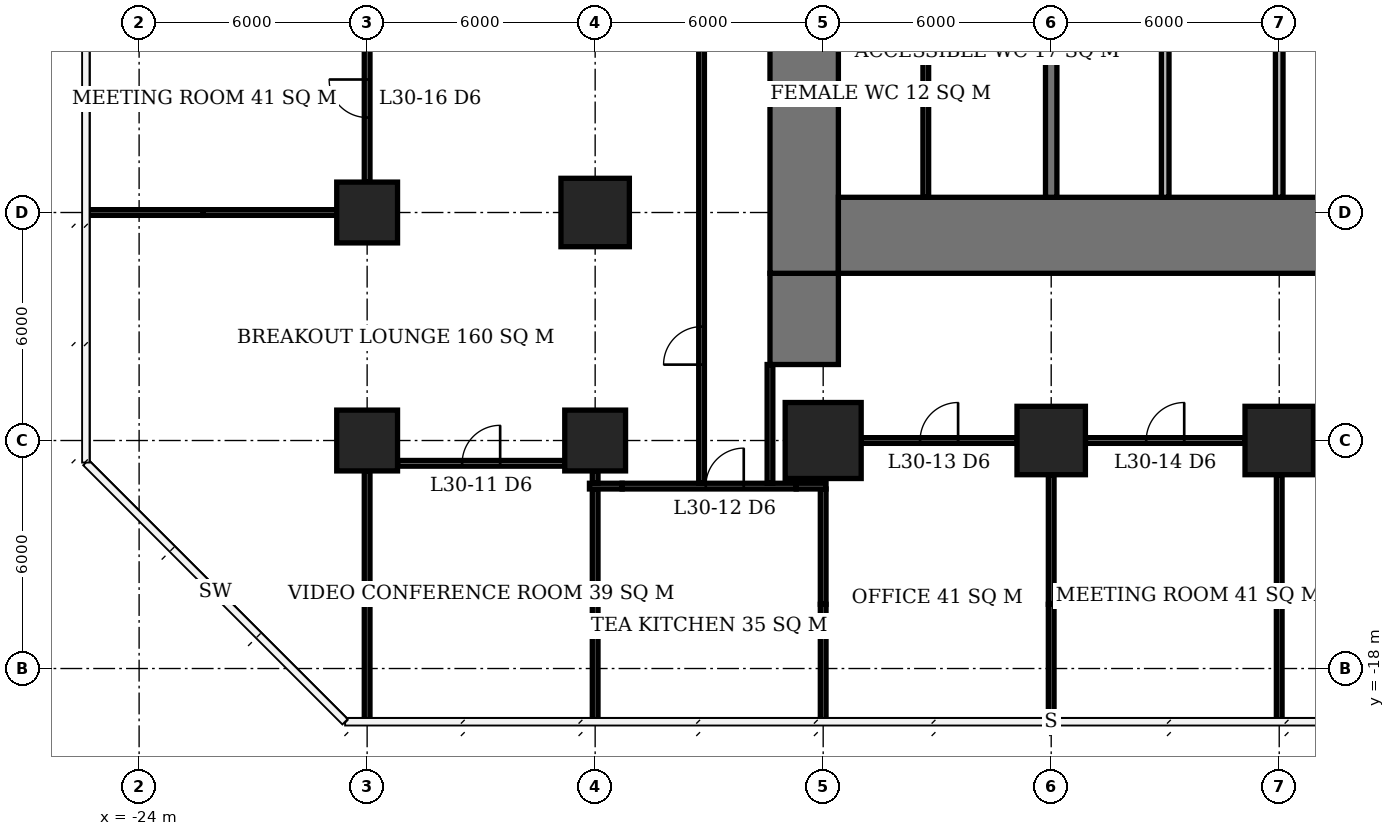
"""IFC4 building model, lengths in metres.
Left out: names, types, materials, properties, quantities, classifications, styles, units other than length and angle.
Written with IfcOpenShell. Run it as: python <this file> out.ifc"""

import sys

from ifc_helpers import new_model, si_unit, direction, frame, frame_2d, origin, origin_2d, place, context, subcontext, project, spatial, rectangle, extrude, element, fill, save


model = new_model("IFC4")
c1 = context("Model", 3, precision=1e-05, world=origin(), true_north=direction((0.0, 1.0)))
c2 = subcontext(c1, "Body", "Model", "MODEL_VIEW")
j1 = project(units=[si_unit("LENGTHUNIT", "METRE"), si_unit("PLANEANGLEUNIT", "RADIAN")], contexts=[c1])
p1 = place(None, origin())
s1 = spatial("IfcSite", under=j1, at=p1, CompositionType="ELEMENT")
p2 = place(p1, origin())
s2 = spatial("IfcBuilding", under=s1, at=p2, CompositionType="ELEMENT")
p3 = place(p2, frame((0.0, 0.0, 125.0)))
s3 = spatial("IfcBuildingStorey", under=s2, at=p3, CompositionType="ELEMENT", Elevation=125.0)
for number, where, z_axis, x_axis in (
    (1, (-18.0, -12.0, 0.0), (0.0, 0.0, 1.0), (1.0, 0.0, 0.0)),
    (2, (-18.0, -6.0, 0.0), (0.0, 0.0, 1.0), (1.0, 0.0, 0.0)),
    (3, (-12.0, -12.0, 0.0), (0.0, 0.0, 1.0), (1.0, 0.0, 0.0)),
):
    element("IfcColumn", number, at=place(p3, frame(where, z_axis=z_axis, x_axis=x_axis)), inside=s3, PredefinedType="COLUMN", context=c2, shape_type="SweptSolid", body=[
        extrude(rectangle(XDim=1.6, YDim=1.6, at=origin_2d()), origin(), (0.0, 0.0, 1.0), 3.9),
    ])
p4 = place(p3, frame((-12.0, -6.0, 0.0), z_axis=(0.0, 0.0, 1.0), x_axis=(1.0, 0.0, 0.0)))
e4 = element("IfcColumn", 4, at=p4, inside=s3, PredefinedType="COLUMN", context=c2, shape_type="SweptSolid", body=[
    extrude(rectangle(XDim=1.8, YDim=1.8, at=origin_2d()), origin(), (0.0, 0.0, 1.0), 3.9),
])
p5 = place(p3, frame((-6.0, -12.0, 0.0), z_axis=(0.0, 0.0, 1.0), x_axis=(1.0, 0.0, 0.0)))
e5 = element("IfcColumn", 5, at=p5, inside=s3, PredefinedType="COLUMN", context=c2, shape_type="SweptSolid", body=[
    extrude(rectangle(XDim=2.0, YDim=2.0, at=origin_2d()), origin(), (0.0, 0.0, 1.0), 3.9),
])
for number, where, z_axis, x_axis in (
    (6, (0.0, -12.0, 0.0), (0.0, 0.0, 1.0), (1.0, 0.0, 0.0)),
    (7, (6.0, -12.0, 0.0), (0.0, 0.0, 1.0), (1.0, 0.0, 0.0)),
):
    element("IfcColumn", number, at=place(p3, frame(where, z_axis=z_axis, x_axis=x_axis)), inside=s3, PredefinedType="COLUMN", context=c2, shape_type="SweptSolid", body=[
        extrude(rectangle(XDim=1.8, YDim=1.8, at=origin_2d()), origin(), (0.0, 0.0, 1.0), 3.9),
    ])
p6 = place(p3, frame((-5.6, -6.6, 0.0), z_axis=(0.0, 0.0, 1.0), x_axis=(1.0, 0.0, 0.0)))
e8 = element("IfcWall", 8, at=p6, inside=s3, PredefinedType="SHEAR", context=c2, shape_type="SweptSolid", body=[
    extrude(rectangle(XDim=23.2, YDim=2.0, at=frame_2d((11.6, 0.0))), origin(), (0.0, 0.0, 1.0), 3.9),
])
p7 = place(p3, frame((-6.5, -7.6, 0.0), z_axis=(0.0, 0.0, 1.0), x_axis=(0.0, 1.0, 0.0)))
e9 = element("IfcWall", 9, at=p7, inside=s3, PredefinedType="SHEAR", context=c2, shape_type="SweptSolid", body=[
    extrude(rectangle(XDim=21.2, YDim=1.8, at=frame_2d((10.6, 0.0))), origin(), (0.0, 0.0, 1.0), 3.9),
])
p8 = place(p7, frame((7.8, 0.0, 0.0)))
e10 = element("IfcOpeningElement", 10, at=p8, cuts=e9, PredefinedType="OPENING", context=c2, shape_type="SweptSolid", body=[
    extrude(rectangle(XDim=1.8, YDim=2.4, at=frame_2d((0.9, 1.2))), frame((0.0, 0.91, 0.0), z_axis=(0.0, -1.0, 0.0), x_axis=(1.0, 0.0, 0.0)), (0.0, 0.0, 1.0), 1.82),
])
p9 = place(p3, frame((-6.5, -10.0, 0.0), z_axis=(0.0, 0.0, 1.0), x_axis=(0.0, 1.0, 0.0)))
e11 = element("IfcWall", 11, at=p9, inside=s3, PredefinedType="SHEAR", context=c2, shape_type="SweptSolid", body=[
    extrude(rectangle(XDim=2.4, YDim=1.8, at=frame_2d((1.2, 0.0))), origin(), (0.0, 0.0, 1.0), 3.9),
])
p10 = place(p3, frame((0.0, -5.6, 0.0), z_axis=(0.0, 0.0, 1.0), x_axis=(0.0, 1.0, 0.0)))
e12 = element("IfcWall", 12, at=p10, inside=s3, PredefinedType="SHEAR", context=c2, shape_type="SweptSolid", body=[
    extrude(rectangle(XDim=5.45, YDim=0.3, at=frame_2d((2.725, 0.0))), origin(), (0.0, 0.0, 1.0), 3.9),
])
for number, where, z_axis, x_axis in (
    (13, (3.0, -5.6, 0.0), (0.0, 0.0, 1.0), (0.0, 1.0, 0.0)),
    (14, (6.0, -5.6, 0.0), (0.0, 0.0, 1.0), (0.0, 1.0, 0.0)),
):
    element("IfcWall", number, at=place(p3, frame(where, z_axis=z_axis, x_axis=x_axis)), inside=s3, PredefinedType="SOLIDWALL", context=c2, shape_type="SweptSolid", body=[
        extrude(rectangle(XDim=5.45, YDim=0.2, at=frame_2d((2.725, 0.0))), origin(), (0.0, 0.0, 1.0), 3.9),
    ])
p11 = place(p3, frame((-3.3, -5.6, 0.0), z_axis=(0.0, 0.0, 1.0), x_axis=(0.0, 1.0, 0.0)))
e15 = element("IfcWall", 15, at=p11, inside=s3, PredefinedType="PLUMBINGWALL", context=c2, shape_type="SweptSolid", body=[
    extrude(rectangle(XDim=5.45, YDim=0.15, at=frame_2d((2.725, 0.0))), origin(), (0.0, 0.0, 1.0), 3.65),
])
p12 = place(p3, frame((-12.15, -13.2, 0.0), z_axis=(0.0, 0.0, 1.0), x_axis=(1.0, 0.0, 0.0)))
e16 = element("IfcWall", 16, at=p12, inside=s3, PredefinedType="PARTITIONING", context=c2, shape_type="SweptSolid", body=[
    extrude(rectangle(XDim=0.86, YDim=0.15, at=frame_2d((0.43, 0.0))), origin(), (0.0, 0.0, 1.0), 2.65),
])
p13 = place(p3, frame((-11.29, -13.2, 0.0), z_axis=(0.0, 0.0, 1.0), x_axis=(1.0, 0.0, 0.0)))
e17 = element("IfcWall", 17, at=p13, inside=s3, PredefinedType="PARTITIONING", context=c2, shape_type="SweptSolid", body=[
    extrude(rectangle(XDim=4.58, YDim=0.15, at=frame_2d((2.29, 0.0))), origin(), (0.0, 0.0, 1.0), 3.65),
])
p14 = place(p13, frame((2.2, 0.0, 0.0)))
e18 = element("IfcOpeningElement", 18, at=p14, cuts=e17, PredefinedType="OPENING", context=c2, shape_type="SweptSolid", body=[
    extrude(rectangle(XDim=1.0, YDim=2.1, at=frame_2d((0.5, 1.05))), frame((0.0, 0.085, 0.0), z_axis=(0.0, -1.0, 0.0), x_axis=(1.0, 0.0, 0.0)), (0.0, 0.0, 1.0), 0.17),
])
p15 = place(p3, frame((-6.71, -13.2, 0.0), z_axis=(0.0, 0.0, 1.0), x_axis=(1.0, 0.0, 0.0)))
e19 = element("IfcWall", 19, at=p15, inside=s3, PredefinedType="PARTITIONING", context=c2, shape_type="SweptSolid", body=[
    extrude(rectangle(XDim=0.785, YDim=0.15, at=frame_2d((0.393, 0.0))), origin(), (0.0, 0.0, 1.0), 2.65),
])
p16 = place(p3, frame((-17.2, -12.6, 0.0), z_axis=(0.0, 0.0, 1.0), x_axis=(1.0, 0.0, 0.0)))
e20 = element("IfcWall", 20, at=p16, inside=s3, PredefinedType="PARTITIONING", context=c2, shape_type="SweptSolid", body=[
    extrude(rectangle(XDim=4.4, YDim=0.15, at=frame_2d((2.2, 0.0))), origin(), (0.0, 0.0, 1.0), 3.65),
])
p17 = place(p16, frame((1.7, 0.0, 0.0)))
e21 = element("IfcOpeningElement", 21, at=p17, cuts=e20, PredefinedType="OPENING", context=c2, shape_type="SweptSolid", body=[
    extrude(rectangle(XDim=1.0, YDim=2.1, at=frame_2d((0.5, 1.05))), frame((0.0, 0.085, 0.0), z_axis=(0.0, -1.0, 0.0), x_axis=(1.0, 0.0, 0.0)), (0.0, 0.0, 1.0), 0.17),
])
p18 = place(p3, frame((-5.0, -12.0, 0.0), z_axis=(0.0, 0.0, 1.0), x_axis=(1.0, 0.0, 0.0)))
e22 = element("IfcWall", 22, at=p18, inside=s3, PredefinedType="PARTITIONING", context=c2, shape_type="SweptSolid", body=[
    extrude(rectangle(XDim=4.1, YDim=0.15, at=frame_2d((2.05, 0.0))), origin(), (0.0, 0.0, 1.0), 3.65),
])
p19 = place(p18, frame((1.55, 0.0, 0.0)))
e23 = element("IfcOpeningElement", 23, at=p19, cuts=e22, PredefinedType="OPENING", context=c2, shape_type="SweptSolid", body=[
    extrude(rectangle(XDim=1.0, YDim=2.1, at=frame_2d((0.5, 1.05))), frame((0.0, 0.085, 0.0), z_axis=(0.0, -1.0, 0.0), x_axis=(1.0, 0.0, 0.0)), (0.0, 0.0, 1.0), 0.17),
])
p20 = place(p3, frame((0.9, -12.0, 0.0), z_axis=(0.0, 0.0, 1.0), x_axis=(1.0, 0.0, 0.0)))
e24 = element("IfcWall", 24, at=p20, inside=s3, PredefinedType="PARTITIONING", context=c2, shape_type="SweptSolid", body=[
    extrude(rectangle(XDim=4.2, YDim=0.15, at=frame_2d((2.1, 0.0))), origin(), (0.0, 0.0, 1.0), 3.65),
])
p21 = place(p20, frame((1.6, 0.0, 0.0)))
e25 = element("IfcOpeningElement", 25, at=p21, cuts=e24, PredefinedType="OPENING", context=c2, shape_type="SweptSolid", body=[
    extrude(rectangle(XDim=1.0, YDim=2.1, at=frame_2d((0.5, 1.05))), frame((0.0, 0.085, 0.0), z_axis=(0.0, -1.0, 0.0), x_axis=(1.0, 0.0, 0.0)), (0.0, 0.0, 1.0), 0.17),
])
p22 = place(p3, frame((-25.4, -6.0, 0.0), z_axis=(0.0, 0.0, 1.0), x_axis=(1.0, 0.0, 0.0)))
e26 = element("IfcWall", 26, at=p22, inside=s3, PredefinedType="PARTITIONING", context=c2, shape_type="SweptSolid", body=[
    extrude(rectangle(XDim=3.09, YDim=0.15, at=frame_2d((1.545, 0.0))), origin(), (0.0, 0.0, 1.0), 3.65),
])
p23 = place(p3, frame((-22.31, -6.0, 0.0), z_axis=(0.0, 0.0, 1.0), x_axis=(1.0, 0.0, 0.0)))
e27 = element("IfcWall", 27, at=p23, inside=s3, PredefinedType="PARTITIONING", context=c2, shape_type="SweptSolid", body=[
    extrude(rectangle(XDim=3.51, YDim=0.15, at=frame_2d((1.755, 0.0))), origin(), (0.0, 0.0, 1.0), 2.65),
])
p24 = place(p3, frame((-18.0, -19.4, 0.0), z_axis=(0.0, 0.0, 1.0), x_axis=(0.0, 1.0, 0.0)))
e28 = element("IfcWall", 28, at=p24, inside=s3, PredefinedType="PARTITIONING", context=c2, shape_type="SweptSolid", body=[
    extrude(rectangle(XDim=3.09, YDim=0.15, at=frame_2d((1.545, 0.0))), origin(), (0.0, 0.0, 1.0), 3.65),
])
p25 = place(p3, frame((-18.0, -16.31, 0.0), z_axis=(0.0, 0.0, 1.0), x_axis=(0.0, 1.0, 0.0)))
e29 = element("IfcWall", 29, at=p25, inside=s3, PredefinedType="PARTITIONING", context=c2, shape_type="SweptSolid", body=[
    extrude(rectangle(XDim=3.51, YDim=0.15, at=frame_2d((1.755, 0.0))), origin(), (0.0, 0.0, 1.0), 2.65),
])
p26 = place(p3, frame((-18.0, -5.2, 0.0), z_axis=(0.0, 0.0, 1.0), x_axis=(0.0, 1.0, 0.0)))
e30 = element("IfcWall", 30, at=p26, inside=s3, PredefinedType="PARTITIONING", context=c2, shape_type="SweptSolid", body=[
    extrude(rectangle(XDim=4.4, YDim=0.15, at=frame_2d((2.2, 0.0))), origin(), (0.0, 0.0, 1.0), 3.65),
])
p27 = place(p26, frame((1.7, 0.0, 0.0)))
e31 = element("IfcOpeningElement", 31, at=p27, cuts=e30, PredefinedType="OPENING", context=c2, shape_type="SweptSolid", body=[
    extrude(rectangle(XDim=1.0, YDim=2.1, at=frame_2d((0.5, 1.05))), frame((0.0, 0.085, 0.0), z_axis=(0.0, -1.0, 0.0), x_axis=(1.0, 0.0, 0.0)), (0.0, 0.0, 1.0), 0.17),
])
p28 = place(p3, frame((-12.0, -19.4, 0.0), z_axis=(0.0, 0.0, 1.0), x_axis=(0.0, 1.0, 0.0)))
e32 = element("IfcWall", 32, at=p28, inside=s3, PredefinedType="PARTITIONING", context=c2, shape_type="SweptSolid", body=[
    extrude(rectangle(XDim=3.09, YDim=0.15, at=frame_2d((1.545, 0.0))), origin(), (0.0, 0.0, 1.0), 3.65),
])
p29 = place(p3, frame((-12.0, -16.31, 0.0), z_axis=(0.0, 0.0, 1.0), x_axis=(0.0, 1.0, 0.0)))
e33 = element("IfcWall", 33, at=p29, inside=s3, PredefinedType="PARTITIONING", context=c2, shape_type="SweptSolid", body=[
    extrude(rectangle(XDim=3.035, YDim=0.15, at=frame_2d((1.518, 0.0))), origin(), (0.0, 0.0, 1.0), 2.65),
])
p30 = place(p3, frame((-12.0, -13.125, 0.0), z_axis=(0.0, 0.0, 1.0), x_axis=(0.0, 1.0, 0.0)))
e34 = element("IfcWall", 34, at=p30, inside=s3, PredefinedType="PARTITIONING", context=c2, shape_type="SweptSolid", body=[
    extrude(rectangle(XDim=0.325, YDim=0.15, at=frame_2d((0.163, 0.0))), origin(), (0.0, 0.0, 1.0), 2.65),
])
p31 = place(p3, frame((-6.0, -19.4, 0.0), z_axis=(0.0, 0.0, 1.0), x_axis=(0.0, 1.0, 0.0)))
e35 = element("IfcWall", 35, at=p31, inside=s3, PredefinedType="PARTITIONING", context=c2, shape_type="SweptSolid", body=[
    extrude(rectangle(XDim=3.09, YDim=0.15, at=frame_2d((1.545, 0.0))), origin(), (0.0, 0.0, 1.0), 3.65),
])
p32 = place(p3, frame((-6.0, -16.31, 0.0), z_axis=(0.0, 0.0, 1.0), x_axis=(0.0, 1.0, 0.0)))
e36 = element("IfcWall", 36, at=p32, inside=s3, PredefinedType="PARTITIONING", context=c2, shape_type="SweptSolid", body=[
    extrude(rectangle(XDim=3.035, YDim=0.15, at=frame_2d((1.518, 0.0))), origin(), (0.0, 0.0, 1.0), 2.65),
])
p33 = place(p3, frame((0.0, -19.35, 0.0), z_axis=(0.0, 0.0, 1.0), x_axis=(0.0, 1.0, 0.0)))
e37 = element("IfcWall", 37, at=p33, inside=s3, PredefinedType="PARTITIONING", context=c2, shape_type="SweptSolid", body=[
    extrude(rectangle(XDim=3.04, YDim=0.15, at=frame_2d((1.52, 0.0))), origin(), (0.0, 0.0, 1.0), 3.65),
])
p34 = place(p3, frame((0.0, -16.31, 0.0), z_axis=(0.0, 0.0, 1.0), x_axis=(0.0, 1.0, 0.0)))
e38 = element("IfcWall", 38, at=p34, inside=s3, PredefinedType="PARTITIONING", context=c2, shape_type="SweptSolid", body=[
    extrude(rectangle(XDim=3.41, YDim=0.15, at=frame_2d((1.705, 0.0))), origin(), (0.0, 0.0, 1.0), 2.65),
])
p35 = place(p3, frame((6.0, -19.4, 0.0), z_axis=(0.0, 0.0, 1.0), x_axis=(0.0, 1.0, 0.0)))
e39 = element("IfcWall", 39, at=p35, inside=s3, PredefinedType="PARTITIONING", context=c2, shape_type="SweptSolid", body=[
    extrude(rectangle(XDim=3.09, YDim=0.15, at=frame_2d((1.545, 0.0))), origin(), (0.0, 0.0, 1.0), 3.65),
])
p36 = place(p3, frame((6.0, -16.31, 0.0), z_axis=(0.0, 0.0, 1.0), x_axis=(0.0, 1.0, 0.0)))
e40 = element("IfcWall", 40, at=p36, inside=s3, PredefinedType="PARTITIONING", context=c2, shape_type="SweptSolid", body=[
    extrude(rectangle(XDim=3.41, YDim=0.15, at=frame_2d((1.705, 0.0))), origin(), (0.0, 0.0, 1.0), 2.65),
])
p37 = place(p3, frame((-9.2, -13.125, 0.0), z_axis=(0.0, 0.0, 1.0), x_axis=(0.0, 1.0, 0.0)))
e41 = element("IfcWall", 41, at=p37, inside=s3, PredefinedType="PARTITIONING", context=c2, shape_type="SweptSolid", body=[
    extrude(rectangle(XDim=12.075, YDim=0.15, at=frame_2d((6.038, 0.0))), origin(), (0.0, 0.0, 1.0), 3.65),
])
p38 = place(p37, frame((3.122, 0.0, 0.0)))
e42 = element("IfcOpeningElement", 42, at=p38, cuts=e41, PredefinedType="OPENING", context=c2, shape_type="SweptSolid", body=[
    extrude(rectangle(XDim=1.0, YDim=2.1, at=frame_2d((0.5, 1.05))), frame((0.0, 0.085, 0.0), z_axis=(0.0, -1.0, 0.0), x_axis=(1.0, 0.0, 0.0)), (0.0, 0.0, 1.0), 0.17),
])
p39 = place(p3, frame((-7.4, -13.125, 0.0), z_axis=(0.0, 0.0, 1.0), x_axis=(0.0, 1.0, 0.0)))
e43 = element("IfcWall", 43, at=p39, inside=s3, PredefinedType="PARTITIONING", context=c2, shape_type="SweptSolid", body=[
    extrude(rectangle(XDim=3.125, YDim=0.15, at=frame_2d((1.562, 0.0))), origin(), (0.0, 0.0, 1.0), 3.65),
])
p40 = place(p17, origin())
e44 = element("IfcDoor", 44, at=p40, inside=s3, OperationType="SINGLE_SWING_RIGHT", PredefinedType="DOOR", context=c2, shape_type="SweptSolid", body=[
    extrude(rectangle(XDim=1.0, YDim=2.1, at=frame_2d((0.5, 1.05))), frame((0.0, 0.025, 0.0), z_axis=(0.0, -1.0, 0.0), x_axis=(1.0, 0.0, 0.0)), (0.0, 0.0, 1.0), 0.05),
])
fill(e21, e44)
p41 = place(p14, origin())
e45 = element("IfcDoor", 45, at=p41, inside=s3, OperationType="SINGLE_SWING_RIGHT", PredefinedType="DOOR", context=c2, shape_type="SweptSolid", body=[
    extrude(rectangle(XDim=1.0, YDim=2.1, at=frame_2d((0.5, 1.05))), frame((0.0, 0.025, 0.0), z_axis=(0.0, -1.0, 0.0), x_axis=(1.0, 0.0, 0.0)), (0.0, 0.0, 1.0), 0.05),
])
fill(e18, e45)
p42 = place(p19, origin())
e46 = element("IfcDoor", 46, at=p42, inside=s3, OperationType="SINGLE_SWING_RIGHT", PredefinedType="DOOR", context=c2, shape_type="SweptSolid", body=[
    extrude(rectangle(XDim=1.0, YDim=2.1, at=frame_2d((0.5, 1.05))), frame((0.0, 0.025, 0.0), z_axis=(0.0, -1.0, 0.0), x_axis=(1.0, 0.0, 0.0)), (0.0, 0.0, 1.0), 0.05),
])
fill(e23, e46)
p43 = place(p21, origin())
e47 = element("IfcDoor", 47, at=p43, inside=s3, OperationType="SINGLE_SWING_RIGHT", PredefinedType="DOOR", context=c2, shape_type="SweptSolid", body=[
    extrude(rectangle(XDim=1.0, YDim=2.1, at=frame_2d((0.5, 1.05))), frame((0.0, 0.025, 0.0), z_axis=(0.0, -1.0, 0.0), x_axis=(1.0, 0.0, 0.0)), (0.0, 0.0, 1.0), 0.05),
])
fill(e25, e47)
p44 = place(p27, origin())
e48 = element("IfcDoor", 48, at=p44, inside=s3, OperationType="SINGLE_SWING_RIGHT", PredefinedType="DOOR", context=c2, shape_type="SweptSolid", body=[
    extrude(rectangle(XDim=1.0, YDim=2.1, at=frame_2d((0.5, 1.05))), frame((0.0, 0.025, 0.0), z_axis=(0.0, -1.0, 0.0), x_axis=(1.0, 0.0, 0.0)), (0.0, 0.0, 1.0), 0.05),
])
fill(e31, e48)
p45 = place(p38, origin())
e49 = element("IfcDoor", 49, at=p45, inside=s3, OperationType="SINGLE_SWING_LEFT", PredefinedType="DOOR", context=c2, shape_type="SweptSolid", body=[
    extrude(rectangle(XDim=1.0, YDim=2.1, at=frame_2d((0.5, 1.05))), frame((0.0, 0.025, 0.0), z_axis=(0.0, -1.0, 0.0), x_axis=(1.0, 0.0, 0.0)), (0.0, 0.0, 1.0), 0.05),
])
fill(e42, e49)
save(model, sys.argv[1])
